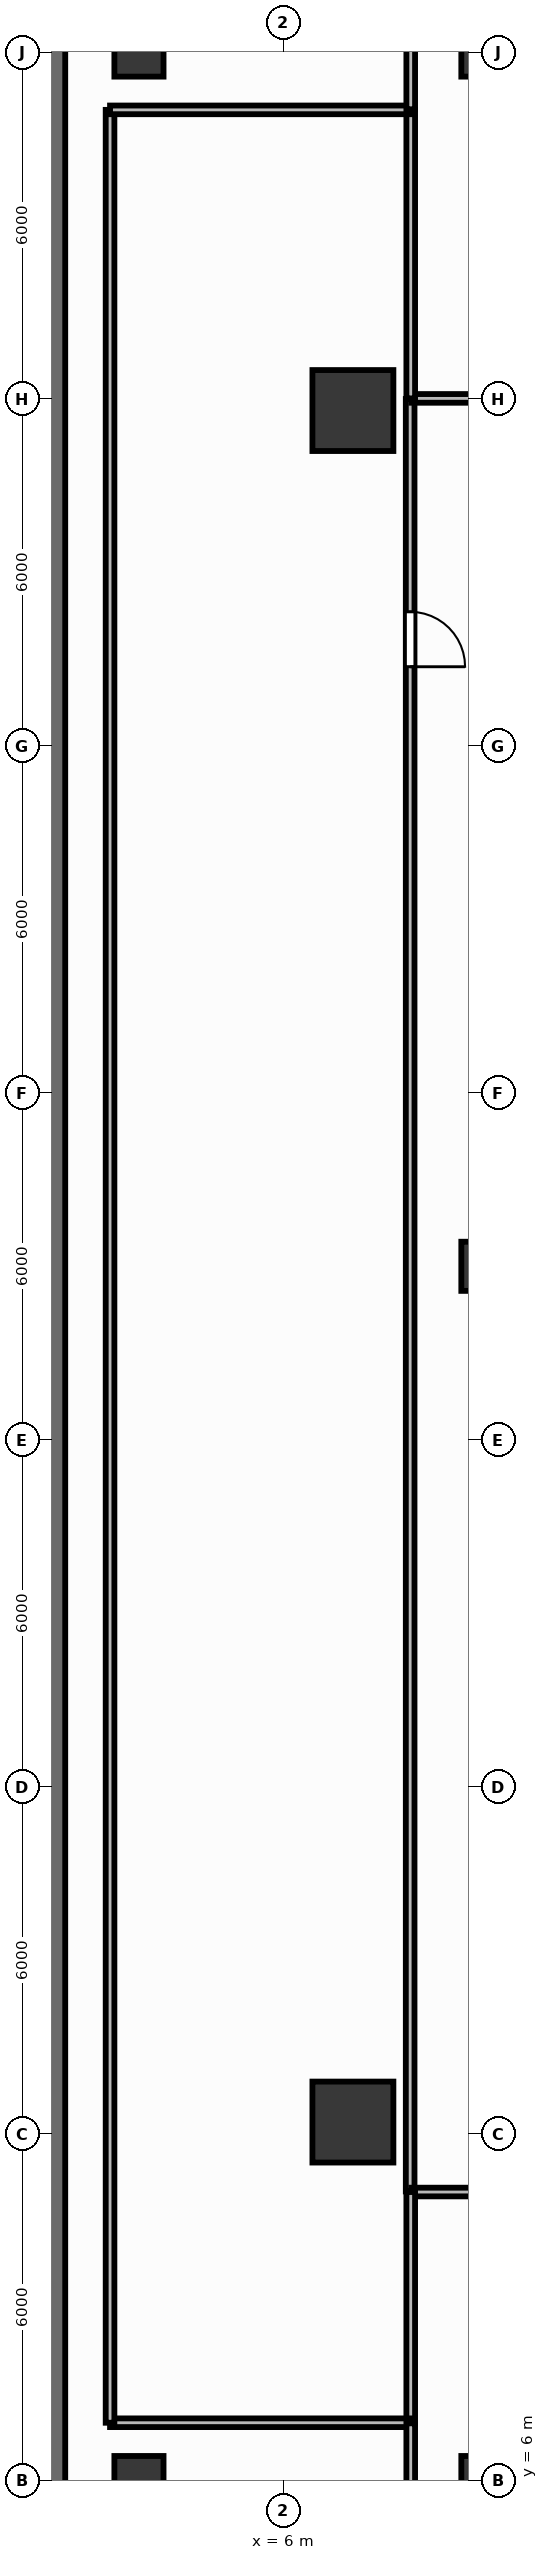
"""IFC4 building model, lengths in metres.
Left out: names, types, materials, properties, quantities, classifications, styles, units other than length and angle.
Written with IfcOpenShell. Run it as: python <this file> out.ifc"""

import sys

from ifc_helpers import new_model, si_unit, direction, frame, frame_2d, origin, origin_2d, place, context, subcontext, project, spatial, rectangle, extrude, element, fill, save


model = new_model("IFC4")
c1 = context("Model", 3, precision=1e-05, world=origin(), true_north=direction((0.0, 1.0)))
c2 = subcontext(c1, "Body", "Model", "MODEL_VIEW")
j1 = project(units=[si_unit("LENGTHUNIT", "METRE"), si_unit("PLANEANGLEUNIT", "RADIAN")], contexts=[c1])
p1 = place(None, origin())
s1 = spatial("IfcSite", under=j1, at=p1, CompositionType="ELEMENT")
p2 = place(p1, origin())
s2 = spatial("IfcBuilding", under=s1, at=p2, CompositionType="ELEMENT")
p3 = place(p2, frame((0.0, 0.0, -4.5)))
s3 = spatial("IfcBuildingStorey", under=s2, at=p3, CompositionType="ELEMENT", Elevation=-4.5)
p4 = place(p3, frame((2.0, 3.25, 0.0), z_axis=(0.0, 0.0, 1.0), x_axis=(0.0, 1.0, 0.0)))
e1 = element("IfcWall", 1, at=p4, inside=s3, PredefinedType="USERDEFINED", context=c2, shape_type="SweptSolid", body=[
    extrude(rectangle(XDim=47.5, YDim=0.45, at=frame_2d((23.75, 0.0))), origin(), (0.0, 0.0, 1.0), 4.182),
])
for number, where, z_axis, x_axis in (
    (2, (3.5, 6.0, 0.0), (0.0, 0.0, 1.0), (1.0, 0.0, 0.0)),
    (3, (3.5, 48.0, 0.0), (0.0, 0.0, 1.0), (1.0, 0.0, 0.0)),
    (4, (9.5, 6.0, 0.0), (0.0, 0.0, 1.0), (1.0, 0.0, 0.0)),
    (5, (9.5, 27.0, 0.0), (0.0, 0.0, 1.0), (1.0, 0.0, 0.0)),
    (6, (9.5, 48.0, 0.0), (0.0, 0.0, 1.0), (1.0, 0.0, 0.0)),
):
    element("IfcColumn", number, at=place(p3, frame(where, z_axis=z_axis, x_axis=x_axis)), inside=s3, PredefinedType="COLUMN", context=c2, shape_type="SweptSolid", body=[
        extrude(rectangle(XDim=0.85, YDim=0.85, at=origin_2d()), origin(), (0.0, 0.0, 1.0), 4.18),
    ])
for number, where, z_axis, x_axis in (
    (7, (7.2, 12.2, 0.0), (0.0, 0.0, 1.0), (1.0, 0.0, 0.0)),
    (8, (7.2, 41.8, 0.0), (0.0, 0.0, 1.0), (1.0, 0.0, 0.0)),
):
    element("IfcColumn", number, at=place(p3, frame(where, z_axis=z_axis, x_axis=x_axis)), inside=s3, PredefinedType="COLUMN", context=c2, shape_type="SweptSolid", body=[
        extrude(rectangle(XDim=1.4, YDim=1.4, at=origin_2d()), origin(), (0.0, 0.0, 1.0), 4.18),
    ])
p5 = place(p3, frame((8.19, 42.0, 0.0), z_axis=(0.0, 0.0, 1.0), x_axis=(0.0, -1.0, 0.0)))
e9 = element("IfcWall", 9, at=p5, inside=s3, PredefinedType="PARTITIONING", context=c2, shape_type="SweptSolid", body=[
    extrude(rectangle(XDim=31.0, YDim=0.15, at=frame_2d((15.5, 0.0))), origin(), (0.0, 0.0, 1.0), 3.04),
])
p6 = place(p5, frame((3.681, 0.0, 0.0)))
e10 = element("IfcOpeningElement", 10, at=p6, cuts=e9, PredefinedType="OPENING", context=c2, shape_type="SweptSolid", body=[
    extrude(rectangle(XDim=0.95, YDim=2.15, at=frame_2d((0.475, 1.075))), frame((0.0, 0.09, 0.0), z_axis=(0.0, -1.0, 0.0), x_axis=(1.0, 0.0, 0.0)), (0.0, 0.0, 1.0), 0.18),
])
p7 = place(p3, frame((52.0, 42.01, 0.0), z_axis=(0.0, 0.0, 1.0), x_axis=(-1.0, 0.0, 0.0)))
e11 = element("IfcWall", 11, at=p7, inside=s3, PredefinedType="PARTITIONING", context=c2, shape_type="SweptSolid", body=[
    extrude(rectangle(XDim=43.79, YDim=0.15, at=frame_2d((21.895, 0.0))), origin(), (0.0, 0.0, 1.0), 3.04),
])
p8 = place(p7, frame((3.333, 0.0, 0.0)))
e12 = element("IfcOpeningElement", 12, at=p8, cuts=e11, PredefinedType="OPENING", context=c2, shape_type="SweptSolid", body=[
    extrude(rectangle(XDim=0.95, YDim=2.15, at=frame_2d((0.475, 1.075))), frame((0.0, 0.09, 0.0), z_axis=(0.0, -1.0, 0.0), x_axis=(1.0, 0.0, 0.0)), (0.0, 0.0, 1.0), 0.18),
])
p9 = place(p3, frame((8.21, 10.99, 0.0), z_axis=(0.0, 0.0, 1.0), x_axis=(1.0, 0.0, 0.0)))
e13 = element("IfcWall", 13, at=p9, inside=s3, PredefinedType="PARTITIONING", context=c2, shape_type="SweptSolid", body=[
    extrude(rectangle(XDim=43.79, YDim=0.15, at=frame_2d((21.895, 0.0))), origin(), (0.0, 0.0, 1.0), 3.04),
])
p10 = place(p9, frame((6.435, 0.0, 0.0)))
e14 = element("IfcOpeningElement", 14, at=p10, cuts=e13, PredefinedType="OPENING", context=c2, shape_type="SweptSolid", body=[
    extrude(rectangle(XDim=0.95, YDim=2.15, at=frame_2d((0.475, 1.075))), frame((0.0, 0.09, 0.0), z_axis=(0.0, -1.0, 0.0), x_axis=(1.0, 0.0, 0.0)), (0.0, 0.0, 1.0), 0.18),
])
p11 = place(p3, frame((8.2, 47.0, 0.0), z_axis=(0.0, 0.0, 1.0), x_axis=(0.0, -1.0, 0.0)))
e15 = element("IfcWall", 15, at=p11, inside=s3, PredefinedType="PARTITIONING", context=c2, shape_type="SweptSolid", body=[
    extrude(rectangle(XDim=4.99, YDim=0.15, at=frame_2d((2.495, 0.0))), origin(), (0.0, 0.0, 1.0), 3.04),
])
p12 = place(p3, frame((8.2, 10.99, 0.0), z_axis=(0.0, 0.0, 1.0), x_axis=(0.0, -1.0, 0.0)))
e16 = element("IfcWall", 16, at=p12, inside=s3, PredefinedType="PARTITIONING", context=c2, shape_type="SweptSolid", body=[
    extrude(rectangle(XDim=3.99, YDim=0.15, at=frame_2d((1.995, 0.0))), origin(), (0.0, 0.0, 1.0), 3.04),
])
p13 = place(p3, frame((8.2, 7.0, 0.0), z_axis=(0.0, 0.0, 1.0), x_axis=(-1.0, 0.0, 0.0)))
e17 = element("IfcWall", 17, at=p13, inside=s3, PredefinedType="PARTITIONING", context=c2, shape_type="SweptSolid", body=[
    extrude(rectangle(XDim=5.2, YDim=0.15, at=frame_2d((2.6, 0.0))), origin(), (0.0, 0.0, 1.0), 3.04),
])
p14 = place(p3, frame((3.0, 7.0, 0.0), z_axis=(0.0, 0.0, 1.0), x_axis=(0.0, 1.0, 0.0)))
e18 = element("IfcWall", 18, at=p14, inside=s3, PredefinedType="PARTITIONING", context=c2, shape_type="SweptSolid", body=[
    extrude(rectangle(XDim=40.0, YDim=0.15, at=frame_2d((20.0, 0.0))), origin(), (0.0, 0.0, 1.0), 3.04),
])
p15 = place(p3, frame((3.0, 47.0, 0.0), z_axis=(0.0, 0.0, 1.0), x_axis=(1.0, 0.0, 0.0)))
e19 = element("IfcWall", 19, at=p15, inside=s3, PredefinedType="PARTITIONING", context=c2, shape_type="SweptSolid", body=[
    extrude(rectangle(XDim=5.2, YDim=0.15, at=frame_2d((2.6, 0.0))), origin(), (0.0, 0.0, 1.0), 3.04),
])
for number, where, z_axis, x_axis in (
    (20, (8.2, 47.01, 0.0), (0.0, 0.0, 1.0), (0.0, 1.0, 0.0)),
    (21, (8.2, 4.0, 0.0), (0.0, 0.0, 1.0), (0.0, 1.0, 0.0)),
):
    element("IfcWall", number, at=place(p3, frame(where, z_axis=z_axis, x_axis=x_axis)), inside=s3, PredefinedType="PARTITIONING", context=c2, shape_type="SweptSolid", body=[
        extrude(rectangle(XDim=2.99, YDim=0.15, at=frame_2d((1.495, 0.0))), origin(), (0.0, 0.0, 1.0), 3.04),
    ])
p16 = place(p6, origin())
e22 = element("IfcDoor", 22, at=p16, inside=s3, OperationType="SINGLE_SWING_RIGHT", PredefinedType="DOOR", context=c2, shape_type="SweptSolid", body=[
    extrude(rectangle(XDim=0.95, YDim=2.15, at=frame_2d((0.475, 1.075))), frame((0.0, 0.025, 0.0), z_axis=(0.0, -1.0, 0.0), x_axis=(1.0, 0.0, 0.0)), (0.0, 0.0, 1.0), 0.05),
])
fill(e10, e22)
save(model, sys.argv[1])
